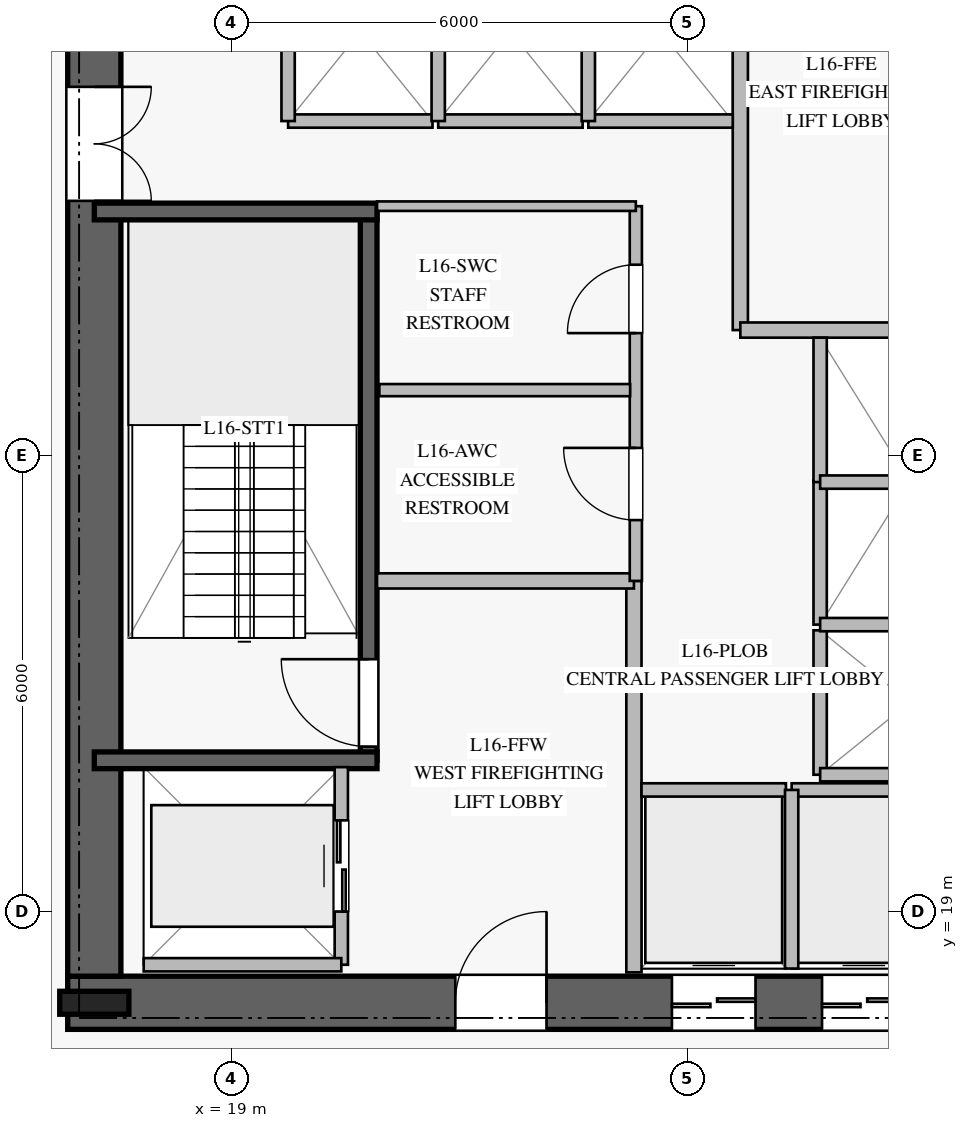
"""IFC4 building model, lengths in metres.
Left out: names, types, materials, properties, quantities, classifications, styles, units other than length and angle.
Written with IfcOpenShell. Run it as: python <this file> out.ifc"""

import sys

from ifc_helpers import new_model, si_unit, direction, frame, frame_2d, origin, origin_2d, place, context, subcontext, project, spatial, rectangle, i_section, extrude, element, fill, save


model = new_model("IFC4")
c1 = context("Model", 3, precision=1e-05, world=origin(), true_north=direction((0.0, 1.0)))
c2 = subcontext(c1, "Body", "Model", "MODEL_VIEW")
j1 = project(units=[si_unit("LENGTHUNIT", "METRE"), si_unit("PLANEANGLEUNIT", "RADIAN")], contexts=[c1])
p1 = place(None, origin())
s1 = spatial("IfcSite", under=j1, at=p1, CompositionType="ELEMENT")
p2 = place(p1, origin())
s2 = spatial("IfcBuilding", under=s1, at=p2, CompositionType="ELEMENT")
p3 = place(p2, frame((0.0, 0.0, 68.0)))
s3 = spatial("IfcBuildingStorey", under=s2, at=p3, CompositionType="ELEMENT", Elevation=68.0)
p4 = place(p3, frame((16.85, 17.8, 0.0), z_axis=(0.0, 0.0, 1.0), x_axis=(1.0, 0.0, 0.0)))
e1 = element("IfcWall", 1, at=p4, inside=s3, PredefinedType="SHEAR", context=c2, shape_type="SweptSolid", body=[
    extrude(rectangle(XDim=16.3, YDim=0.7, at=frame_2d((8.15, 0.0))), origin(), (0.0, 0.0, 1.0), 3.76),
])
p5 = place(p4, frame((5.1, 0.0, 0.0)))
e2 = element("IfcOpeningElement", 2, at=p5, cuts=e1, PredefinedType="OPENING", context=c2, shape_type="SweptSolid", body=[
    extrude(rectangle(XDim=1.2, YDim=2.25, at=frame_2d((0.6, 1.125))), frame((0.0, 0.36, 0.0), z_axis=(0.0, -1.0, 0.0), x_axis=(1.0, 0.0, 0.0)), (0.0, 0.0, 1.0), 0.72),
])
p6 = place(p4, frame((14.05, 0.0, 0.0)))
e3 = element("IfcOpeningElement", 3, at=p6, cuts=e1, PredefinedType="OPENING", context=c2, shape_type="SweptSolid", body=[
    extrude(rectangle(XDim=0.9, YDim=2.1, at=frame_2d((0.45, 1.05))), frame((0.0, 0.36, 0.0), z_axis=(0.0, -1.0, 0.0), x_axis=(1.0, 0.0, 0.0)), (0.0, 0.0, 1.0), 0.72),
])
p7 = place(p4, frame((7.95, 0.0, 0.0)))
e4 = element("IfcOpeningElement", 4, at=p7, cuts=e1, PredefinedType="OPENING", context=c2, shape_type="SweptSolid", body=[
    extrude(rectangle(XDim=1.1, YDim=2.2, at=frame_2d((0.55, 1.1))), frame((0.0, 0.36, 0.0), z_axis=(0.0, -1.0, 0.0), x_axis=(1.0, 0.0, 0.0)), (0.0, 0.0, 1.0), 0.72),
])
p8 = place(p4, frame((9.925, 0.0, 0.0)))
e5 = element("IfcOpeningElement", 5, at=p8, cuts=e1, PredefinedType="OPENING", context=c2, shape_type="SweptSolid", body=[
    extrude(rectangle(XDim=1.1, YDim=2.2, at=frame_2d((0.55, 1.1))), frame((0.0, 0.36, 0.0), z_axis=(0.0, -1.0, 0.0), x_axis=(1.0, 0.0, 0.0)), (0.0, 0.0, 1.0), 0.72),
])
p9 = place(p4, frame((11.9, 0.0, 0.0)))
e6 = element("IfcOpeningElement", 6, at=p9, cuts=e1, PredefinedType="OPENING", context=c2, shape_type="SweptSolid", body=[
    extrude(rectangle(XDim=1.1, YDim=2.2, at=frame_2d((0.55, 1.1))), frame((0.0, 0.36, 0.0), z_axis=(0.0, -1.0, 0.0), x_axis=(1.0, 0.0, 0.0)), (0.0, 0.0, 1.0), 0.72),
])
p10 = place(p3, frame((17.2, 31.85, 0.0), z_axis=(0.0, 0.0, 1.0), x_axis=(0.0, -1.0, 0.0)))
e7 = element("IfcWall", 7, at=p10, inside=s3, PredefinedType="SHEAR", context=c2, shape_type="SweptSolid", body=[
    extrude(rectangle(XDim=13.7, YDim=0.7, at=frame_2d((6.85, 0.0))), origin(), (0.0, 0.0, 1.0), 3.76),
])
p11 = place(p10, frame((2.0, 0.0, 0.0)))
e8 = element("IfcOpeningElement", 8, at=p11, cuts=e7, PredefinedType="OPENING", context=c2, shape_type="SweptSolid", body=[
    extrude(rectangle(XDim=1.5, YDim=2.2, at=frame_2d((0.75, 1.1))), frame((0.0, 0.36, 0.0), z_axis=(0.0, -1.0, 0.0), x_axis=(1.0, 0.0, 0.0)), (0.0, 0.0, 1.0), 0.72),
])
p12 = place(p3, frame((17.2, 17.8, 0.0), z_axis=(0.0, 0.0, 1.0), x_axis=(1.0, 0.0, 0.0)))
e9 = element("IfcColumn", 9, at=p12, inside=s3, PredefinedType="COLUMN", context=c2, shape_type="SweptSolid", body=[
    extrude(i_section(OverallWidth=0.302, OverallDepth=0.91, WebThickness=0.021, FlangeThickness=0.04, at=origin_2d()), origin(), (0.0, 0.0, 1.0), 4.0),
])
p13 = place(p3, frame((20.81, 20.99, 0.0), z_axis=(0.0, 0.0, 1.0), x_axis=(0.0, 1.0, 0.0)))
e10 = element("IfcWall", 10, at=p13, inside=s3, PredefinedType="SOLIDWALL", context=c2, shape_type="SweptSolid", body=[
    extrude(rectangle(XDim=7.22, YDim=0.22, at=frame_2d((3.61, 0.0))), origin(), (0.0, 0.0, 1.0), 3.76),
])
p14 = place(p13, frame((0.18, 0.0, 0.0)))
e11 = element("IfcOpeningElement", 11, at=p14, cuts=e10, PredefinedType="OPENING", context=c2, shape_type="SweptSolid", body=[
    extrude(rectangle(XDim=1.15, YDim=2.2, at=frame_2d((0.575, 1.1))), frame((0.0, 0.12, 0.0), z_axis=(0.0, -1.0, 0.0), x_axis=(1.0, 0.0, 0.0)), (0.0, 0.0, 1.0), 0.24),
])
for number, where, z_axis, x_axis in (
    (12, (17.2, 20.99, 0.0), (0.0, 0.0, 1.0), (1.0, 0.0, 0.0)),
    (13, (17.2, 28.21, 0.0), (0.0, 0.0, 1.0), (1.0, 0.0, 0.0)),
):
    element("IfcWall", number, at=place(p3, frame(where, z_axis=z_axis, x_axis=x_axis)), inside=s3, PredefinedType="SOLIDWALL", context=c2, shape_type="SweptSolid", body=[
        extrude(rectangle(XDim=3.72, YDim=0.22, at=frame_2d((1.86, 0.0))), origin(), (0.0, 0.0, 1.0), 3.76),
    ])
p15 = place(p3, frame((24.3, 18.2, 0.0), z_axis=(0.0, 0.0, 1.0), x_axis=(0.0, 1.0, 0.0)))
e14 = element("IfcWall", 14, at=p15, inside=s3, PredefinedType="PARTITIONING", context=c2, shape_type="SweptSolid", body=[
    extrude(rectangle(XDim=5.15, YDim=0.2, at=frame_2d((2.575, 0.0))), origin(), (0.0, 0.0, 1.0), 3.76),
])
p16 = place(p3, frame((20.92, 23.35, 0.0), z_axis=(0.0, 0.0, 1.0), x_axis=(1.0, 0.0, 0.0)))
e15 = element("IfcWall", 15, at=p16, inside=s3, PredefinedType="PARTITIONING", context=c2, shape_type="SweptSolid", body=[
    extrude(rectangle(XDim=3.38, YDim=0.2, at=frame_2d((1.69, 0.0))), origin(), (0.0, 0.0, 1.0), 3.76),
])
p17 = place(p3, frame((25.7, 26.65, 0.0), z_axis=(0.0, 0.0, 1.0), x_axis=(0.0, 1.0, 0.0)))
e16 = element("IfcWall", 16, at=p17, inside=s3, PredefinedType="PARTITIONING", context=c2, shape_type="SweptSolid", body=[
    extrude(rectangle(XDim=5.15, YDim=0.2, at=frame_2d((2.575, 0.0))), origin(), (0.0, 0.0, 1.0), 3.76),
])
p18 = place(p3, frame((25.7, 26.65, 0.0), z_axis=(0.0, 0.0, 1.0), x_axis=(1.0, 0.0, 0.0)))
e17 = element("IfcWall", 17, at=p18, inside=s3, PredefinedType="PARTITIONING", context=c2, shape_type="SweptSolid", body=[
    extrude(rectangle(XDim=3.38, YDim=0.2, at=frame_2d((1.69, 0.0))), origin(), (0.0, 0.0, 1.0), 3.76),
])
p19 = place(p3, frame((24.325, 23.35, 0.0), z_axis=(0.0, 0.0, 1.0), x_axis=(0.0, 1.0, 0.0)))
e18 = element("IfcWall", 18, at=p19, inside=s3, PredefinedType="PLUMBINGWALL", context=c2, shape_type="SweptSolid", body=[
    extrude(rectangle(XDim=4.93, YDim=0.16, at=frame_2d((2.465, 0.0))), origin(), (0.0, 0.0, 1.0), 3.76),
])
p20 = place(p19, frame((0.8, 0.0, 0.0)))
e19 = element("IfcOpeningElement", 19, at=p20, cuts=e18, PredefinedType="OPENING", context=c2, shape_type="SweptSolid", body=[
    extrude(rectangle(XDim=0.95, YDim=2.1, at=frame_2d((0.475, 1.05))), frame((0.0, 0.09, 0.0), z_axis=(0.0, -1.0, 0.0), x_axis=(1.0, 0.0, 0.0)), (0.0, 0.0, 1.0), 0.18),
])
p21 = place(p19, frame((3.26, 0.0, 0.0)))
e20 = element("IfcOpeningElement", 20, at=p21, cuts=e18, PredefinedType="OPENING", context=c2, shape_type="SweptSolid", body=[
    extrude(rectangle(XDim=0.9, YDim=2.1, at=frame_2d((0.45, 1.05))), frame((0.0, 0.09, 0.0), z_axis=(0.0, -1.0, 0.0), x_axis=(1.0, 0.0, 0.0)), (0.0, 0.0, 1.0), 0.18),
])
p22 = place(p3, frame((20.92, 28.28, 0.0), z_axis=(0.0, 0.0, 1.0), x_axis=(1.0, 0.0, 0.0)))
e21 = element("IfcWall", 21, at=p22, inside=s3, PredefinedType="PARTITIONING", context=c2, shape_type="SweptSolid", body=[
    extrude(rectangle(XDim=3.405, YDim=0.125, at=frame_2d((1.703, 0.0))), origin(), (0.0, 0.0, 1.0), 3.76),
])
p23 = place(p3, frame((20.95, 25.86, 0.0), z_axis=(0.0, 0.0, 1.0), x_axis=(1.0, 0.0, 0.0)))
e22 = element("IfcWall", 22, at=p23, inside=s3, PredefinedType="PLUMBINGWALL", context=c2, shape_type="SweptSolid", body=[
    extrude(rectangle(XDim=3.3, YDim=0.16, at=frame_2d((1.65, 0.0))), origin(), (0.0, 0.0, 1.0), 3.76),
])
p24 = place(p3, frame((24.4, 20.6, 0.0), z_axis=(0.0, 0.0, 1.0), x_axis=(1.0, 0.0, 0.0)))
e23 = element("IfcWall", 23, at=p24, inside=s3, PredefinedType="PARTITIONING", context=c2, shape_type="SweptSolid", body=[
    extrude(rectangle(XDim=1.9, YDim=0.175, at=frame_2d((0.95, 0.0))), origin(), (0.0, 0.0, 1.0), 3.76),
])
p25 = place(p3, frame((26.375, 20.6, 0.0), z_axis=(0.0, 0.0, 1.0), x_axis=(1.0, 0.0, 0.0)))
e24 = element("IfcWall", 24, at=p25, inside=s3, PredefinedType="PARTITIONING", context=c2, shape_type="SweptSolid", body=[
    extrude(rectangle(XDim=1.9, YDim=0.175, at=frame_2d((0.95, 0.0))), origin(), (0.0, 0.0, 1.0), 3.76),
])
p26 = place(p3, frame((26.375, 18.25, 0.0), z_axis=(0.0, 0.0, 1.0), x_axis=(0.0, 1.0, 0.0)))
e25 = element("IfcWall", 25, at=p26, inside=s3, PredefinedType="PARTITIONING", context=c2, shape_type="SweptSolid", body=[
    extrude(rectangle(XDim=2.35, YDim=0.175, at=frame_2d((1.175, 0.0))), origin(), (0.0, 0.0, 1.0), 3.76),
])
p27 = place(p3, frame((19.75, 29.4, 0.0), z_axis=(0.0, 0.0, 1.0), x_axis=(1.0, 0.0, 0.0)))
e26 = element("IfcWall", 26, at=p27, inside=s3, PredefinedType="PARTITIONING", context=c2, shape_type="SweptSolid", body=[
    extrude(rectangle(XDim=1.9, YDim=0.175, at=frame_2d((0.95, 0.0))), origin(), (0.0, 0.0, 1.0), 3.76),
])
p28 = place(p3, frame((19.75, 29.4, 0.0), z_axis=(0.0, 0.0, 1.0), x_axis=(0.0, 1.0, 0.0)))
e27 = element("IfcWall", 27, at=p28, inside=s3, PredefinedType="PARTITIONING", context=c2, shape_type="SweptSolid", body=[
    extrude(rectangle(XDim=2.35, YDim=0.175, at=frame_2d((1.175, 0.0))), origin(), (0.0, 0.0, 1.0), 3.76),
])
p29 = place(p3, frame((21.725, 29.4, 0.0), z_axis=(0.0, 0.0, 1.0), x_axis=(1.0, 0.0, 0.0)))
e28 = element("IfcWall", 28, at=p29, inside=s3, PredefinedType="PARTITIONING", context=c2, shape_type="SweptSolid", body=[
    extrude(rectangle(XDim=1.9, YDim=0.175, at=frame_2d((0.95, 0.0))), origin(), (0.0, 0.0, 1.0), 3.76),
])
p30 = place(p3, frame((21.725, 29.4, 0.0), z_axis=(0.0, 0.0, 1.0), x_axis=(0.0, 1.0, 0.0)))
e29 = element("IfcWall", 29, at=p30, inside=s3, PredefinedType="PARTITIONING", context=c2, shape_type="SweptSolid", body=[
    extrude(rectangle(XDim=2.35, YDim=0.175, at=frame_2d((1.175, 0.0))), origin(), (0.0, 0.0, 1.0), 3.76),
])
p31 = place(p3, frame((23.7, 29.4, 0.0), z_axis=(0.0, 0.0, 1.0), x_axis=(1.0, 0.0, 0.0)))
e30 = element("IfcWall", 30, at=p31, inside=s3, PredefinedType="PARTITIONING", context=c2, shape_type="SweptSolid", body=[
    extrude(rectangle(XDim=1.9, YDim=0.175, at=frame_2d((0.95, 0.0))), origin(), (0.0, 0.0, 1.0), 3.76),
])
p32 = place(p3, frame((23.7, 29.4, 0.0), z_axis=(0.0, 0.0, 1.0), x_axis=(0.0, 1.0, 0.0)))
e31 = element("IfcWall", 31, at=p32, inside=s3, PredefinedType="PARTITIONING", context=c2, shape_type="SweptSolid", body=[
    extrude(rectangle(XDim=2.35, YDim=0.175, at=frame_2d((1.175, 0.0))), origin(), (0.0, 0.0, 1.0), 3.76),
])
p33 = place(p3, frame((26.75, 20.8, 0.0), z_axis=(0.0, 0.0, 1.0), x_axis=(0.0, 1.0, 0.0)))
e32 = element("IfcWall", 32, at=p33, inside=s3, PredefinedType="PARTITIONING", context=c2, shape_type="SweptSolid", body=[
    extrude(rectangle(XDim=1.9, YDim=0.175, at=frame_2d((0.95, 0.0))), origin(), (0.0, 0.0, 1.0), 3.76),
])
p34 = place(p3, frame((26.75, 20.8, 0.0), z_axis=(0.0, 0.0, 1.0), x_axis=(1.0, 0.0, 0.0)))
e33 = element("IfcWall", 33, at=p34, inside=s3, PredefinedType="PARTITIONING", context=c2, shape_type="SweptSolid", body=[
    extrude(rectangle(XDim=2.35, YDim=0.175, at=frame_2d((1.175, 0.0))), origin(), (0.0, 0.0, 1.0), 3.76),
])
p35 = place(p3, frame((26.75, 22.775, 0.0), z_axis=(0.0, 0.0, 1.0), x_axis=(0.0, 1.0, 0.0)))
e34 = element("IfcWall", 34, at=p35, inside=s3, PredefinedType="PARTITIONING", context=c2, shape_type="SweptSolid", body=[
    extrude(rectangle(XDim=1.9, YDim=0.175, at=frame_2d((0.95, 0.0))), origin(), (0.0, 0.0, 1.0), 3.76),
])
p36 = place(p3, frame((26.75, 22.775, 0.0), z_axis=(0.0, 0.0, 1.0), x_axis=(1.0, 0.0, 0.0)))
e35 = element("IfcWall", 35, at=p36, inside=s3, PredefinedType="PARTITIONING", context=c2, shape_type="SweptSolid", body=[
    extrude(rectangle(XDim=2.35, YDim=0.175, at=frame_2d((1.175, 0.0))), origin(), (0.0, 0.0, 1.0), 3.76),
])
p37 = place(p3, frame((26.75, 24.65, 0.0), z_axis=(0.0, 0.0, 1.0), x_axis=(0.0, 1.0, 0.0)))
e36 = element("IfcWall", 36, at=p37, inside=s3, PredefinedType="PARTITIONING", context=c2, shape_type="SweptSolid", body=[
    extrude(rectangle(XDim=1.9, YDim=0.175, at=frame_2d((0.95, 0.0))), origin(), (0.0, 0.0, 1.0), 3.76),
])
p38 = place(p3, frame((26.75, 24.65, 0.0), z_axis=(0.0, 0.0, 1.0), x_axis=(1.0, 0.0, 0.0)))
e37 = element("IfcWall", 37, at=p38, inside=s3, PredefinedType="PARTITIONING", context=c2, shape_type="SweptSolid", body=[
    extrude(rectangle(XDim=2.35, YDim=0.175, at=frame_2d((1.175, 0.0))), origin(), (0.0, 0.0, 1.0), 3.76),
])
p39 = place(p3, frame((20.45, 18.3, 0.0), z_axis=(0.0, 0.0, 1.0), x_axis=(0.0, 1.0, 0.0)))
e38 = element("IfcWall", 38, at=p39, inside=s3, PredefinedType="PARTITIONING", context=c2, shape_type="SweptSolid", body=[
    extrude(rectangle(XDim=2.6, YDim=0.175, at=frame_2d((1.3, 0.0))), origin(), (0.0, 0.0, 1.0), 3.76),
])
p40 = place(p39, frame((0.7, 0.0, 0.0)))
e39 = element("IfcOpeningElement", 39, at=p40, cuts=e38, PredefinedType="OPENING", context=c2, shape_type="SweptSolid", body=[
    extrude(rectangle(XDim=1.2, YDim=2.2, at=frame_2d((0.6, 1.1))), frame((0.0, 0.098, 0.0), z_axis=(0.0, -1.0, 0.0), x_axis=(1.0, 0.0, 0.0)), (0.0, 0.0, 1.0), 0.195),
])
p41 = place(p3, frame((17.85, 18.3, 0.0), z_axis=(0.0, 0.0, 1.0), x_axis=(1.0, 0.0, 0.0)))
e40 = element("IfcWall", 40, at=p41, inside=s3, PredefinedType="PARTITIONING", context=c2, shape_type="SweptSolid", body=[
    extrude(rectangle(XDim=2.6, YDim=0.175, at=frame_2d((1.3, 0.0))), origin(), (0.0, 0.0, 1.0), 3.76),
])
p42 = place(p14, origin())
e41 = element("IfcDoor", 41, at=p42, inside=s3, OperationType="SINGLE_SWING_RIGHT", PredefinedType="DOOR", context=c2, shape_type="SweptSolid", body=[
    extrude(rectangle(XDim=1.15, YDim=2.2, at=frame_2d((0.575, 1.1))), frame((0.0, 0.025, 0.0), z_axis=(0.0, -1.0, 0.0), x_axis=(1.0, 0.0, 0.0)), (0.0, 0.0, 1.0), 0.05),
])
fill(e11, e41)
p43 = place(p5, origin())
e42 = element("IfcDoor", 42, at=p43, inside=s3, OperationType="SINGLE_SWING_RIGHT", PredefinedType="DOOR", context=c2, shape_type="SweptSolid", body=[
    extrude(rectangle(XDim=1.2, YDim=2.25, at=frame_2d((0.6, 1.125))), frame((0.0, 0.025, 0.0), z_axis=(0.0, -1.0, 0.0), x_axis=(1.0, 0.0, 0.0)), (0.0, 0.0, 1.0), 0.05),
])
fill(e2, e42)
p44 = place(p11, origin())
e43 = element("IfcDoor", 43, at=p44, inside=s3, OperationType="DOUBLE_DOOR_SINGLE_SWING", PredefinedType="DOOR", context=c2, shape_type="SweptSolid", body=[
    extrude(rectangle(XDim=1.5, YDim=2.2, at=frame_2d((0.75, 1.1))), frame((0.0, 0.025, 0.0), z_axis=(0.0, -1.0, 0.0), x_axis=(1.0, 0.0, 0.0)), (0.0, 0.0, 1.0), 0.05),
])
fill(e8, e43)
p45 = place(p20, origin())
e44 = element("IfcDoor", 44, at=p45, inside=s3, OperationType="SINGLE_SWING_RIGHT", PredefinedType="DOOR", context=c2, shape_type="SweptSolid", body=[
    extrude(rectangle(XDim=0.95, YDim=2.1, at=frame_2d((0.475, 1.05))), frame((0.0, 0.025, 0.0), z_axis=(0.0, -1.0, 0.0), x_axis=(1.0, 0.0, 0.0)), (0.0, 0.0, 1.0), 0.05),
])
fill(e19, e44)
p46 = place(p21, origin())
e45 = element("IfcDoor", 45, at=p46, inside=s3, OperationType="SINGLE_SWING_LEFT", PredefinedType="DOOR", context=c2, shape_type="SweptSolid", body=[
    extrude(rectangle(XDim=0.9, YDim=2.1, at=frame_2d((0.45, 1.05))), frame((0.0, 0.025, 0.0), z_axis=(0.0, -1.0, 0.0), x_axis=(1.0, 0.0, 0.0)), (0.0, 0.0, 1.0), 0.05),
])
fill(e20, e45)
p47 = place(p7, origin())
e46 = element("IfcDoor", 46, at=p47, inside=s3, OperationType="DOUBLE_DOOR_SLIDING", PredefinedType="DOOR", context=c2, shape_type="SweptSolid", body=[
    extrude(rectangle(XDim=1.1, YDim=2.2, at=frame_2d((0.55, 1.1))), frame((0.0, 0.025, 0.0), z_axis=(0.0, -1.0, 0.0), x_axis=(1.0, 0.0, 0.0)), (0.0, 0.0, 1.0), 0.05),
])
fill(e4, e46)
p48 = place(p8, origin())
e47 = element("IfcDoor", 47, at=p48, inside=s3, OperationType="DOUBLE_DOOR_SLIDING", PredefinedType="DOOR", context=c2, shape_type="SweptSolid", body=[
    extrude(rectangle(XDim=1.1, YDim=2.2, at=frame_2d((0.55, 1.1))), frame((0.0, 0.025, 0.0), z_axis=(0.0, -1.0, 0.0), x_axis=(1.0, 0.0, 0.0)), (0.0, 0.0, 1.0), 0.05),
])
fill(e5, e47)
p49 = place(p40, origin())
e48 = element("IfcDoor", 48, at=p49, inside=s3, OperationType="DOUBLE_DOOR_SLIDING", PredefinedType="DOOR", context=c2, shape_type="SweptSolid", body=[
    extrude(rectangle(XDim=1.2, YDim=2.2, at=frame_2d((0.6, 1.1))), frame((0.0, 0.025, 0.0), z_axis=(0.0, -1.0, 0.0), x_axis=(1.0, 0.0, 0.0)), (0.0, 0.0, 1.0), 0.05),
])
fill(e39, e48)
save(model, sys.argv[1])
